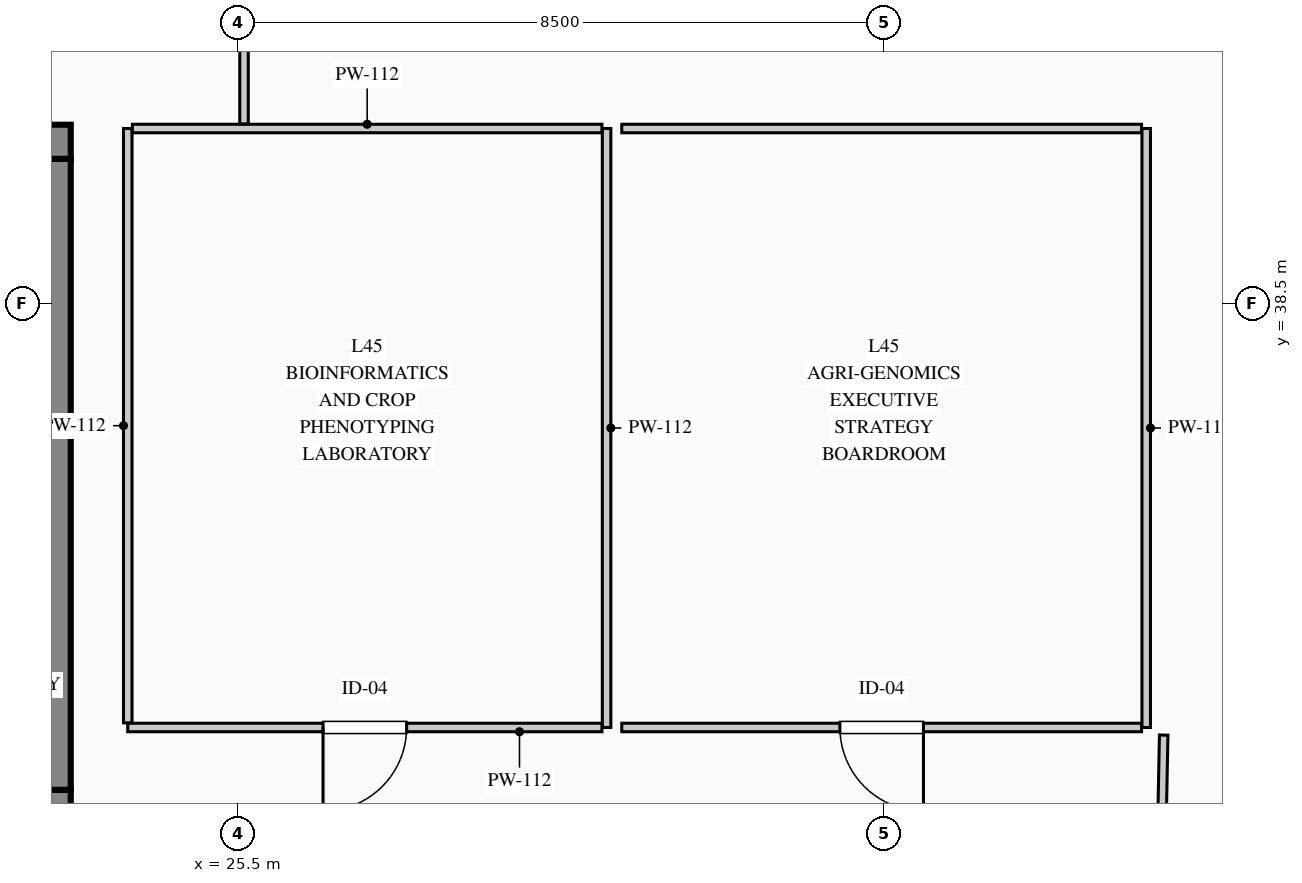
"""IFC4 building model, lengths in metres.
Left out: names, types, materials, properties, quantities, classifications, styles, units other than length and angle.
Written with IfcOpenShell. Run it as: python <this file> out.ifc"""

import sys

from ifc_helpers import new_model, si_unit, direction, frame, frame_2d, origin, place, context, subcontext, project, spatial, rectangle, extrude, element, fill, save


model = new_model("IFC4")
c1 = context("Model", 3, precision=1e-05, world=origin(), true_north=direction((0.0, 1.0)))
c2 = subcontext(c1, "Body", "Model", "MODEL_VIEW")
j1 = project(units=[si_unit("LENGTHUNIT", "METRE"), si_unit("PLANEANGLEUNIT", "RADIAN")], contexts=[c1])
p1 = place(None, origin())
s1 = spatial("IfcSite", under=j1, at=p1, CompositionType="ELEMENT")
p2 = place(p1, origin())
s2 = spatial("IfcBuilding", under=s1, at=p2, CompositionType="ELEMENT")
p3 = place(p2, frame((0.0, 0.0, 191.65)))
s3 = spatial("IfcBuildingStorey", under=s2, at=p3, CompositionType="ELEMENT", Elevation=191.65)
p4 = place(p3, frame((5.55, 40.625, 0.0), z_axis=(0.0, 0.0, 1.0), x_axis=(1.0, 0.0, 0.0)))
e1 = element("IfcWall", 1, at=p4, inside=s3, PredefinedType="SHEAR", context=c2, shape_type="SweptSolid", body=[
    extrude(rectangle(XDim=17.75, YDim=0.45, at=frame_2d((8.875, 0.0))), origin(), (0.0, 0.0, 1.0), 3.95),
])
p5 = place(p4, frame((15.895, 0.0, 0.0)))
e2 = element("IfcOpeningElement", 2, at=p5, cuts=e1, PredefinedType="OPENING", context=c2, shape_type="SweptSolid", body=[
    extrude(rectangle(XDim=1.18, YDim=2.25, at=frame_2d((0.59, 1.125))), frame((0.0, 0.235, 0.0), z_axis=(0.0, -1.0, 0.0), x_axis=(1.0, 0.0, 0.0)), (0.0, 0.0, 1.0), 0.47),
])
p6 = place(p3, frame((5.55, 31.875, 0.0), z_axis=(0.0, 0.0, 1.0), x_axis=(1.0, 0.0, 0.0)))
e3 = element("IfcWall", 3, at=p6, inside=s3, PredefinedType="SHEAR", context=c2, shape_type="SweptSolid", body=[
    extrude(rectangle(XDim=17.75, YDim=0.45, at=frame_2d((8.875, 0.0))), origin(), (0.0, 0.0, 1.0), 3.95),
])
p7 = place(p6, frame((3.1, 0.0, 0.0)))
e4 = element("IfcOpeningElement", 4, at=p7, cuts=e3, PredefinedType="OPENING", context=c2, shape_type="SweptSolid", body=[
    extrude(rectangle(XDim=1.2, YDim=2.2, at=frame_2d((0.6, 1.1))), frame((0.0, 0.235, 0.0), z_axis=(0.0, -1.0, 0.0), x_axis=(1.0, 0.0, 0.0)), (0.0, 0.0, 1.0), 0.47),
])
p8 = place(p6, frame((6.95, 0.0, 0.0)))
e5 = element("IfcOpeningElement", 5, at=p8, cuts=e3, PredefinedType="OPENING", context=c2, shape_type="SweptSolid", body=[
    extrude(rectangle(XDim=1.2, YDim=2.2, at=frame_2d((0.6, 1.1))), frame((0.0, 0.235, 0.0), z_axis=(0.0, -1.0, 0.0), x_axis=(1.0, 0.0, 0.0)), (0.0, 0.0, 1.0), 0.47),
])
p9 = place(p6, frame((8.8, 0.0, 0.0)))
e6 = element("IfcOpeningElement", 6, at=p9, cuts=e3, PredefinedType="OPENING", context=c2, shape_type="SweptSolid", body=[
    extrude(rectangle(XDim=1.15, YDim=2.2, at=frame_2d((0.575, 1.1))), frame((0.0, 0.235, 0.0), z_axis=(0.0, -1.0, 0.0), x_axis=(1.0, 0.0, 0.0)), (0.0, 0.0, 1.0), 0.47),
])
p10 = place(p6, frame((15.9, 0.0, 0.0)))
e7 = element("IfcOpeningElement", 7, at=p10, cuts=e3, PredefinedType="OPENING", context=c2, shape_type="SweptSolid", body=[
    extrude(rectangle(XDim=1.2, YDim=2.2, at=frame_2d((0.6, 1.1))), frame((0.0, 0.235, 0.0), z_axis=(0.0, -1.0, 0.0), x_axis=(1.0, 0.0, 0.0)), (0.0, 0.0, 1.0), 0.47),
])
p11 = place(p3, frame((23.075, 32.1, 0.0), z_axis=(0.0, 0.0, 1.0), x_axis=(0.0, 1.0, 0.0)))
e8 = element("IfcWall", 8, at=p11, inside=s3, PredefinedType="SHEAR", context=c2, shape_type="SweptSolid", body=[
    extrude(rectangle(XDim=8.3, YDim=0.45, at=frame_2d((4.15, 0.0))), origin(), (0.0, 0.0, 1.0), 3.95),
])
p12 = place(p3, frame((30.35, 40.8, 0.0), z_axis=(0.0, 0.0, 1.0), x_axis=(0.0, -1.0, 0.0)))
e9 = element("IfcWall", 9, at=p12, inside=s3, PredefinedType="PARTITIONING", context=c2, shape_type="SweptSolid", body=[
    extrude(rectangle(XDim=7.88, YDim=0.112, at=frame_2d((3.94, 0.0))), origin(), (0.0, 0.0, 1.0), 3.7),
])
p13 = place(p3, frame((30.289, 32.92, 0.0), z_axis=(0.0, 0.0, 1.0), x_axis=(-1.0, 0.0, 0.0)))
e10 = element("IfcWall", 10, at=p13, inside=s3, PredefinedType="PARTITIONING", context=c2, shape_type="SweptSolid", body=[
    extrude(rectangle(XDim=6.239, YDim=0.112, at=frame_2d((3.12, 0.0))), origin(), (0.0, 0.0, 1.0), 3.7),
])
p14 = place(p13, frame((2.57, 0.0, 0.0)))
e11 = element("IfcOpeningElement", 11, at=p14, cuts=e10, PredefinedType="OPENING", context=c2, shape_type="SweptSolid", body=[
    extrude(rectangle(XDim=1.1, YDim=2.2, at=frame_2d((0.55, 1.1))), frame((0.0, 0.066, 0.0), z_axis=(0.0, -1.0, 0.0), x_axis=(1.0, 0.0, 0.0)), (0.0, 0.0, 1.0), 0.132),
])
p15 = place(p3, frame((24.05, 32.981, 0.0), z_axis=(0.0, 0.0, 1.0), x_axis=(0.0, 1.0, 0.0)))
e12 = element("IfcWall", 12, at=p15, inside=s3, PredefinedType="PARTITIONING", context=c2, shape_type="SweptSolid", body=[
    extrude(rectangle(XDim=7.819, YDim=0.112, at=frame_2d((3.91, 0.0))), origin(), (0.0, 0.0, 1.0), 3.7),
])
p16 = place(p3, frame((24.111, 40.8, 0.0), z_axis=(0.0, 0.0, 1.0), x_axis=(1.0, 0.0, 0.0)))
e13 = element("IfcWall", 13, at=p16, inside=s3, PredefinedType="PARTITIONING", context=c2, shape_type="SweptSolid", body=[
    extrude(rectangle(XDim=6.178, YDim=0.112, at=frame_2d((3.089, 0.0))), origin(), (0.0, 0.0, 1.0), 3.7),
])
p17 = place(p3, frame((37.45, 40.8, 0.0), z_axis=(0.0, 0.0, 1.0), x_axis=(0.0, -1.0, 0.0)))
e14 = element("IfcWall", 14, at=p17, inside=s3, PredefinedType="PARTITIONING", context=c2, shape_type="SweptSolid", body=[
    extrude(rectangle(XDim=7.88, YDim=0.112, at=frame_2d((3.94, 0.0))), origin(), (0.0, 0.0, 1.0), 3.7),
])
p18 = place(p3, frame((37.389, 32.92, 0.0), z_axis=(0.0, 0.0, 1.0), x_axis=(-1.0, 0.0, 0.0)))
e15 = element("IfcWall", 15, at=p18, inside=s3, PredefinedType="PARTITIONING", context=c2, shape_type="SweptSolid", body=[
    extrude(rectangle(XDim=6.839, YDim=0.112, at=frame_2d((3.419, 0.0))), origin(), (0.0, 0.0, 1.0), 3.7),
])
p19 = place(p18, frame((2.869, 0.0, 0.0)))
e16 = element("IfcOpeningElement", 16, at=p19, cuts=e15, PredefinedType="OPENING", context=c2, shape_type="SweptSolid", body=[
    extrude(rectangle(XDim=1.1, YDim=2.2, at=frame_2d((0.55, 1.1))), frame((0.0, 0.066, 0.0), z_axis=(0.0, -1.0, 0.0), x_axis=(1.0, 0.0, 0.0)), (0.0, 0.0, 1.0), 0.132),
])
p20 = place(p3, frame((30.55, 40.8, 0.0), z_axis=(0.0, 0.0, 1.0), x_axis=(1.0, 0.0, 0.0)))
e17 = element("IfcWall", 17, at=p20, inside=s3, PredefinedType="PARTITIONING", context=c2, shape_type="SweptSolid", body=[
    extrude(rectangle(XDim=6.839, YDim=0.112, at=frame_2d((3.419, 0.0))), origin(), (0.0, 0.0, 1.0), 3.7),
])
p21 = place(p3, frame((37.599, 28.691, 0.0), z_axis=(0.0, 0.0, 1.0), x_axis=(0.019566997539, 0.999808547977, 0.0)))
e18 = element("IfcWall", 18, at=p21, inside=s3, PredefinedType="PARTITIONING", context=c2, shape_type="SweptSolid", body=[
    extrude(rectangle(XDim=4.13, YDim=0.112, at=frame_2d((2.065, 0.0))), origin(), (0.0, 0.0, 1.0), 3.7),
])
p22 = place(p21, frame((1.515, 0.0, 0.0)))
e19 = element("IfcOpeningElement", 19, at=p22, cuts=e18, PredefinedType="OPENING", context=c2, shape_type="SweptSolid", body=[
    extrude(rectangle(XDim=1.1, YDim=2.2, at=frame_2d((0.55, 1.1))), frame((0.0, 0.066, 0.0), z_axis=(0.0, -1.0, 0.0), x_axis=(1.0, 0.0, 0.0)), (0.0, 0.0, 1.0), 0.132),
])
p23 = place(p3, frame((25.58, 40.861, 0.0), z_axis=(0.0, 0.0, 1.0), x_axis=(0.0, 1.0, 0.0)))
e20 = element("IfcWall", 20, at=p23, inside=s3, PredefinedType="PARTITIONING", context=c2, shape_type="SweptSolid", body=[
    extrude(rectangle(XDim=2.374, YDim=0.112, at=frame_2d((1.187, 0.0))), origin(), (0.0, 0.0, 1.0), 3.7),
])
p24 = place(p14, origin())
e21 = element("IfcDoor", 21, at=p24, inside=s3, OperationType="SINGLE_SWING_RIGHT", PredefinedType="DOOR", context=c2, shape_type="SweptSolid", body=[
    extrude(rectangle(XDim=1.1, YDim=2.2, at=frame_2d((0.55, 1.1))), frame((0.0, 0.025, 0.0), z_axis=(0.0, -1.0, 0.0), x_axis=(1.0, 0.0, 0.0)), (0.0, 0.0, 1.0), 0.05),
])
fill(e11, e21)
p25 = place(p19, origin())
e22 = element("IfcDoor", 22, at=p25, inside=s3, OperationType="SINGLE_SWING_LEFT", PredefinedType="DOOR", context=c2, shape_type="SweptSolid", body=[
    extrude(rectangle(XDim=1.1, YDim=2.2, at=frame_2d((0.55, 1.1))), frame((0.0, 0.025, 0.0), z_axis=(0.0, -1.0, 0.0), x_axis=(1.0, 0.0, 0.0)), (0.0, 0.0, 1.0), 0.05),
])
fill(e16, e22)
save(model, sys.argv[1])
